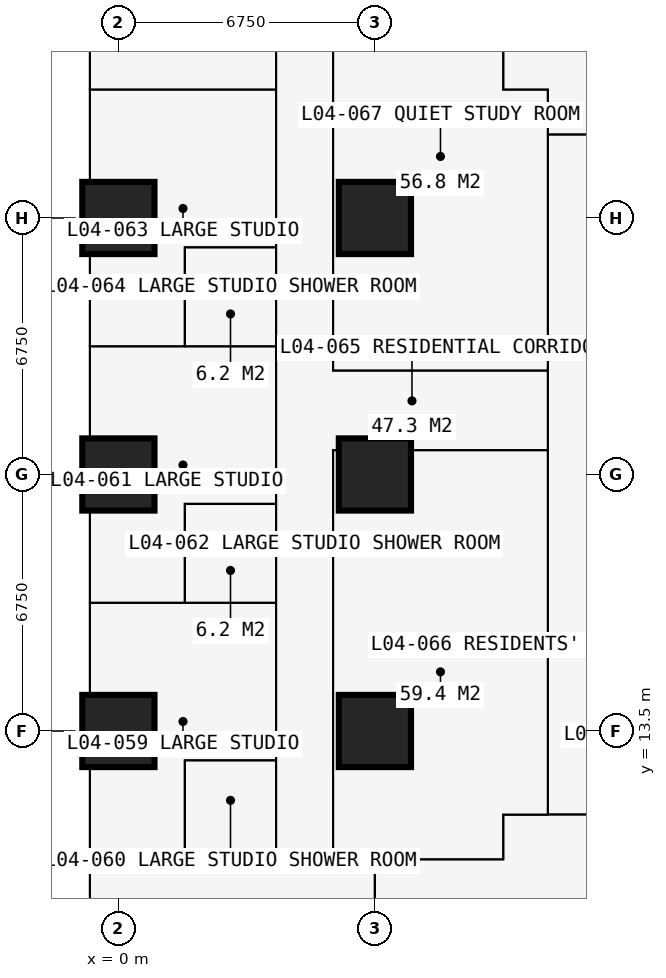
"""IFC4 building model, lengths in metres.
Left out: names, types, materials, properties, quantities, classifications, styles, units other than length and angle.
Written with IfcOpenShell. Run it as: python <this file> out.ifc"""

import sys

from ifc_helpers import new_model, si_unit, direction, frame, frame_2d, origin, origin_2d, place, context, subcontext, project, spatial, rectangle, extrude, element, fill, save


model = new_model("IFC4")
c1 = context("Model", 3, precision=1e-05, world=origin(), true_north=direction((0.0, 1.0)))
c2 = subcontext(c1, "Body", "Model", "MODEL_VIEW")
j1 = project(units=[si_unit("LENGTHUNIT", "METRE"), si_unit("PLANEANGLEUNIT", "RADIAN")], contexts=[c1])
p1 = place(None, origin())
s1 = spatial("IfcSite", under=j1, at=p1, CompositionType="ELEMENT")
p2 = place(p1, origin())
s2 = spatial("IfcBuilding", under=s1, at=p2, CompositionType="ELEMENT")
p3 = place(p2, frame((0.0, 0.0, 18.0)))
s3 = spatial("IfcBuildingStorey", under=s2, at=p3, CompositionType="ELEMENT", Elevation=18.0)
for number, where, z_axis, x_axis in (
    (1, (0.0, 13.5, 0.0), (0.0, 0.0, 1.0), (1.0, 0.0, 0.0)),
    (2, (0.0, 20.25, 0.0), (0.0, 0.0, 1.0), (1.0, 0.0, 0.0)),
    (3, (0.0, 27.0, 0.0), (0.0, 0.0, 1.0), (1.0, 0.0, 0.0)),
    (4, (6.75, 13.5, 0.0), (0.0, 0.0, 1.0), (1.0, 0.0, 0.0)),
    (5, (6.75, 20.25, 0.0), (0.0, 0.0, 1.0), (1.0, 0.0, 0.0)),
    (6, (6.75, 27.0, 0.0), (0.0, 0.0, 1.0), (1.0, 0.0, 0.0)),
):
    element("IfcColumn", number, at=place(p3, frame(where, z_axis=z_axis, x_axis=x_axis)), inside=s3, PredefinedType="COLUMN", context=c2, shape_type="SweptSolid", body=[
        extrude(rectangle(XDim=1.9, YDim=1.9, at=origin_2d()), origin(), (0.0, 0.0, 1.0), 3.6),
    ])
p4 = place(p3, frame((-0.75, 13.5, 0.0), z_axis=(0.0, 0.0, 1.0), x_axis=(0.0, 1.0, 0.0)))
e7 = element("IfcWall", 7, at=p4, inside=s3, PredefinedType="SOLIDWALL", context=c2, shape_type="SweptSolid", body=[
    extrude(rectangle(XDim=6.75, YDim=0.15, at=frame_2d((3.375, 0.0))), origin(), (0.0, 0.0, 1.0), 3.375),
])
p5 = place(p4, frame((0.996, 0.0, 0.0)))
e8 = element("IfcOpeningElement", 8, at=p5, cuts=e7, PredefinedType="OPENING", context=c2, shape_type="SweptSolid", body=[
    extrude(rectangle(XDim=1.0, YDim=2.2, at=frame_2d((0.5, 1.1))), frame((0.0, 0.085, 0.0), z_axis=(0.0, -1.0, 0.0), x_axis=(1.0, 0.0, 0.0)), (0.0, 0.0, 1.0), 0.17),
])
p6 = place(p4, frame((2.042, 0.0, 0.9)))
e9 = element("IfcOpeningElement", 9, at=p6, cuts=e7, PredefinedType="OPENING", context=c2, shape_type="SweptSolid", body=[
    extrude(rectangle(XDim=1.2, YDim=1.8, at=frame_2d((0.6, 0.9))), frame((0.0, 0.085, 0.0), z_axis=(0.0, -1.0, 0.0), x_axis=(1.0, 0.0, 0.0)), (0.0, 0.0, 1.0), 0.17),
])
p7 = place(p4, frame((4.754, 0.0, 0.0)))
e10 = element("IfcOpeningElement", 10, at=p7, cuts=e7, PredefinedType="OPENING", context=c2, shape_type="SweptSolid", body=[
    extrude(rectangle(XDim=1.0, YDim=2.2, at=frame_2d((0.5, 1.1))), frame((0.0, 0.085, 0.0), z_axis=(0.0, -1.0, 0.0), x_axis=(1.0, 0.0, 0.0)), (0.0, 0.0, 1.0), 0.17),
])
p8 = place(p4, frame((3.508, 0.0, 0.9)))
e11 = element("IfcOpeningElement", 11, at=p8, cuts=e7, PredefinedType="OPENING", context=c2, shape_type="SweptSolid", body=[
    extrude(rectangle(XDim=1.2, YDim=1.8, at=frame_2d((0.6, 0.9))), frame((0.0, 0.085, 0.0), z_axis=(0.0, -1.0, 0.0), x_axis=(1.0, 0.0, 0.0)), (0.0, 0.0, 1.0), 0.17),
])
p9 = place(p3, frame((-0.85, 16.875, 0.0), z_axis=(0.0, 0.0, 1.0), x_axis=(-1.0, 0.0, 0.0)))
e12 = element("IfcWall", 12, at=p9, inside=s3, PredefinedType="USERDEFINED", context=c2, shape_type="SweptSolid", body=[
    extrude(rectangle(XDim=2.2, YDim=1.0, at=frame_2d((1.1, 0.0))), origin(), (0.0, 0.0, 1.0), 0.9),
])
p10 = place(p3, frame((-0.734, 10.125, 0.0), z_axis=(0.0, 0.0, 1.0), x_axis=(1.0, 0.0, 0.0)))
e13 = element("IfcWall", 13, at=p10, inside=s3, PredefinedType="PARTITIONING", context=c2, shape_type="SweptSolid", body=[
    extrude(rectangle(XDim=10.859, YDim=0.15, at=frame_2d((5.429, 0.0))), origin(), (0.0, 0.0, 1.0), 3.375),
])
p11 = place(p3, frame((-0.734, 16.875, 0.0), z_axis=(0.0, 0.0, 1.0), x_axis=(1.0, 0.0, 0.0)))
e14 = element("IfcWall", 14, at=p11, inside=s3, PredefinedType="PARTITIONING", context=c2, shape_type="SweptSolid", body=[
    extrude(rectangle(XDim=4.884, YDim=0.175, at=frame_2d((2.442, 0.0))), origin(), (0.0, 0.0, 1.0), 3.375),
])
p12 = place(p11, frame((3.234, 0.0, 0.0)))
e15 = element("IfcOpeningElement", 15, at=p12, cuts=e14, PredefinedType="OPENING", context=c2, shape_type="SweptSolid", body=[
    extrude(rectangle(XDim=0.9, YDim=2.2, at=frame_2d((0.45, 1.1))), frame((0.0, 0.097, 0.0), z_axis=(0.0, -1.0, 0.0), x_axis=(1.0, 0.0, 0.0)), (0.0, 0.0, 1.0), 0.195),
])
p13 = place(p3, frame((-0.734, 23.625, 0.0), z_axis=(0.0, 0.0, 1.0), x_axis=(1.0, 0.0, 0.0)))
e16 = element("IfcWall", 16, at=p13, inside=s3, PredefinedType="PARTITIONING", context=c2, shape_type="SweptSolid", body=[
    extrude(rectangle(XDim=4.884, YDim=0.175, at=frame_2d((2.442, 0.0))), origin(), (0.0, 0.0, 1.0), 3.375),
])
p14 = place(p13, frame((3.234, 0.0, 0.0)))
e17 = element("IfcOpeningElement", 17, at=p14, cuts=e16, PredefinedType="OPENING", context=c2, shape_type="SweptSolid", body=[
    extrude(rectangle(XDim=0.9, YDim=2.2, at=frame_2d((0.45, 1.1))), frame((0.0, 0.097, 0.0), z_axis=(0.0, -1.0, 0.0), x_axis=(1.0, 0.0, 0.0)), (0.0, 0.0, 1.0), 0.195),
])
p15 = place(p3, frame((-0.734, 30.375, 0.0), z_axis=(0.0, 0.0, 1.0), x_axis=(1.0, 0.0, 0.0)))
e18 = element("IfcWall", 18, at=p15, inside=s3, PredefinedType="PARTITIONING", context=c2, shape_type="SweptSolid", body=[
    extrude(rectangle(XDim=4.884, YDim=0.15, at=frame_2d((2.442, 0.0))), origin(), (0.0, 0.0, 1.0), 3.375),
])
p16 = place(p3, frame((1.75, 10.125, 0.0), z_axis=(0.0, 0.0, 1.0), x_axis=(0.0, 1.0, 0.0)))
e19 = element("IfcWall", 19, at=p16, inside=s3, PredefinedType="PARTITIONING", context=c2, shape_type="SweptSolid", body=[
    extrude(rectangle(XDim=2.6, YDim=0.1, at=frame_2d((1.3, 0.0))), origin(), (0.0, 0.0, 1.0), 3.375),
])
p17 = place(p16, frame((0.85, 0.0, 0.0)))
e20 = element("IfcOpeningElement", 20, at=p17, cuts=e19, PredefinedType="OPENING", context=c2, shape_type="SweptSolid", body=[
    extrude(rectangle(XDim=0.9, YDim=2.2, at=frame_2d((0.45, 1.1))), frame((0.0, 0.06, 0.0), z_axis=(0.0, -1.0, 0.0), x_axis=(1.0, 0.0, 0.0)), (0.0, 0.0, 1.0), 0.12),
])
p18 = place(p3, frame((1.75, 12.725, 0.0), z_axis=(0.0, 0.0, 1.0), x_axis=(1.0, 0.0, 0.0)))
e21 = element("IfcWall", 21, at=p18, inside=s3, PredefinedType="PARTITIONING", context=c2, shape_type="SweptSolid", body=[
    extrude(rectangle(XDim=2.4, YDim=0.1, at=frame_2d((1.2, 0.0))), origin(), (0.0, 0.0, 1.0), 3.375),
])
p19 = place(p3, frame((1.75, 16.875, 0.0), z_axis=(0.0, 0.0, 1.0), x_axis=(0.0, 1.0, 0.0)))
e22 = element("IfcWall", 22, at=p19, inside=s3, PredefinedType="PARTITIONING", context=c2, shape_type="SweptSolid", body=[
    extrude(rectangle(XDim=2.6, YDim=0.1, at=frame_2d((1.3, 0.0))), origin(), (0.0, 0.0, 1.0), 3.375),
])
p20 = place(p3, frame((1.75, 19.475, 0.0), z_axis=(0.0, 0.0, 1.0), x_axis=(1.0, 0.0, 0.0)))
e23 = element("IfcWall", 23, at=p20, inside=s3, PredefinedType="PARTITIONING", context=c2, shape_type="SweptSolid", body=[
    extrude(rectangle(XDim=2.4, YDim=0.1, at=frame_2d((1.2, 0.0))), origin(), (0.0, 0.0, 1.0), 3.375),
])
p21 = place(p3, frame((1.75, 23.625, 0.0), z_axis=(0.0, 0.0, 1.0), x_axis=(0.0, 1.0, 0.0)))
e24 = element("IfcWall", 24, at=p21, inside=s3, PredefinedType="PARTITIONING", context=c2, shape_type="SweptSolid", body=[
    extrude(rectangle(XDim=2.6, YDim=0.1, at=frame_2d((1.3, 0.0))), origin(), (0.0, 0.0, 1.0), 3.375),
])
p22 = place(p3, frame((1.75, 26.225, 0.0), z_axis=(0.0, 0.0, 1.0), x_axis=(1.0, 0.0, 0.0)))
e25 = element("IfcWall", 25, at=p22, inside=s3, PredefinedType="PARTITIONING", context=c2, shape_type="SweptSolid", body=[
    extrude(rectangle(XDim=2.4, YDim=0.1, at=frame_2d((1.2, 0.0))), origin(), (0.0, 0.0, 1.0), 3.375),
])
p23 = place(p3, frame((4.15, 10.125, 0.0), z_axis=(0.0, 0.0, 1.0), x_axis=(0.0, 1.0, 0.0)))
e26 = element("IfcWall", 26, at=p23, inside=s3, PredefinedType="PARTITIONING", context=c2, shape_type="SweptSolid", body=[
    extrude(rectangle(XDim=23.625, YDim=0.15, at=frame_2d((11.812, 0.0))), origin(), (0.0, 0.0, 1.0), 3.375),
])
p24 = place(p23, frame((4.2, 0.0, 0.0)))
e27 = element("IfcOpeningElement", 27, at=p24, cuts=e26, PredefinedType="OPENING", context=c2, shape_type="SweptSolid", body=[
    extrude(rectangle(XDim=0.95, YDim=2.2, at=frame_2d((0.475, 1.1))), frame((0.0, 0.085, 0.0), z_axis=(0.0, -1.0, 0.0), x_axis=(1.0, 0.0, 0.0)), (0.0, 0.0, 1.0), 0.17),
])
p25 = place(p23, frame((10.95, 0.0, 0.0)))
e28 = element("IfcOpeningElement", 28, at=p25, cuts=e26, PredefinedType="OPENING", context=c2, shape_type="SweptSolid", body=[
    extrude(rectangle(XDim=0.95, YDim=2.2, at=frame_2d((0.475, 1.1))), frame((0.0, 0.085, 0.0), z_axis=(0.0, -1.0, 0.0), x_axis=(1.0, 0.0, 0.0)), (0.0, 0.0, 1.0), 0.17),
])
p26 = place(p23, frame((17.7, 0.0, 0.0)))
e29 = element("IfcOpeningElement", 29, at=p26, cuts=e26, PredefinedType="OPENING", context=c2, shape_type="SweptSolid", body=[
    extrude(rectangle(XDim=0.95, YDim=2.2, at=frame_2d((0.475, 1.1))), frame((0.0, 0.085, 0.0), z_axis=(0.0, -1.0, 0.0), x_axis=(1.0, 0.0, 0.0)), (0.0, 0.0, 1.0), 0.17),
])
p27 = place(p3, frame((5.65, 10.125, 0.0), z_axis=(0.0, 0.0, 1.0), x_axis=(0.0, 1.0, 0.0)))
e30 = element("IfcWall", 30, at=p27, inside=s3, PredefinedType="PARTITIONING", context=c2, shape_type="SweptSolid", body=[
    extrude(rectangle(XDim=10.762, YDim=0.15, at=frame_2d((5.381, 0.0))), origin(), (0.0, 0.0, 1.0), 3.375),
])
p28 = place(p27, frame((4.9, 0.0, 0.0)))
e31 = element("IfcOpeningElement", 31, at=p28, cuts=e30, PredefinedType="OPENING", context=c2, shape_type="SweptSolid", body=[
    extrude(rectangle(XDim=0.95, YDim=2.2, at=frame_2d((0.475, 1.1))), frame((0.0, 0.085, 0.0), z_axis=(0.0, -1.0, 0.0), x_axis=(1.0, 0.0, 0.0)), (0.0, 0.0, 1.0), 0.17),
])
p29 = place(p3, frame((5.65, 20.887, 0.0), z_axis=(0.0, 0.0, 1.0), x_axis=(1.0, 0.0, 0.0)))
e32 = element("IfcWall", 32, at=p29, inside=s3, PredefinedType="PARTITIONING", context=c2, shape_type="SweptSolid", body=[
    extrude(rectangle(XDim=5.65, YDim=0.15, at=frame_2d((2.825, 0.0))), origin(), (0.0, 0.0, 1.0), 3.375),
])
p30 = place(p3, frame((5.65, 22.988, 0.0), z_axis=(0.0, 0.0, 1.0), x_axis=(0.0, 1.0, 0.0)))
e33 = element("IfcWall", 33, at=p30, inside=s3, PredefinedType="PARTITIONING", context=c2, shape_type="SweptSolid", body=[
    extrude(rectangle(XDim=10.762, YDim=0.15, at=frame_2d((5.381, 0.0))), origin(), (0.0, 0.0, 1.0), 3.375),
])
p31 = place(p30, frame((5.0, 0.0, 0.0)))
e34 = element("IfcOpeningElement", 34, at=p31, cuts=e33, PredefinedType="OPENING", context=c2, shape_type="SweptSolid", body=[
    extrude(rectangle(XDim=0.95, YDim=2.2, at=frame_2d((0.475, 1.1))), frame((0.0, 0.085, 0.0), z_axis=(0.0, -1.0, 0.0), x_axis=(1.0, 0.0, 0.0)), (0.0, 0.0, 1.0), 0.17),
])
p32 = place(p3, frame((5.65, 22.988, 0.0), z_axis=(0.0, 0.0, 1.0), x_axis=(1.0, 0.0, 0.0)))
e35 = element("IfcWall", 35, at=p32, inside=s3, PredefinedType="PARTITIONING", context=c2, shape_type="SweptSolid", body=[
    extrude(rectangle(XDim=5.65, YDim=0.15, at=frame_2d((2.825, 0.0))), origin(), (0.0, 0.0, 1.0), 3.375),
])
p33 = place(p3, frame((6.75, 4.15, 0.0), z_axis=(0.0, 0.0, 1.0), x_axis=(0.0, 1.0, 0.0)))
e36 = element("IfcWall", 36, at=p33, inside=s3, PredefinedType="PARTITIONING", context=c2, shape_type="SweptSolid", body=[
    extrude(rectangle(XDim=5.975, YDim=0.15, at=frame_2d((2.988, 0.0))), origin(), (0.0, 0.0, 1.0), 2.877),
])
p34 = place(p3, frame((10.125, 10.125, 0.0), z_axis=(0.0, 0.0, 1.0), x_axis=(0.0, 1.0, 0.0)))
e37 = element("IfcWall", 37, at=p34, inside=s3, PredefinedType="PARTITIONING", context=c2, shape_type="SweptSolid", body=[
    extrude(rectangle(XDim=1.175, YDim=0.15, at=frame_2d((0.587, 0.0))), origin(), (0.0, 0.0, 1.0), 3.375),
])
p35 = place(p3, frame((10.125, 11.3, 0.0), z_axis=(0.0, 0.0, 1.0), x_axis=(1.0, 0.0, 0.0)))
e38 = element("IfcWall", 38, at=p35, inside=s3, PredefinedType="PARTITIONING", context=c2, shape_type="SweptSolid", body=[
    extrude(rectangle(XDim=20.675, YDim=0.15, at=frame_2d((10.337, 0.0))), origin(), (0.0, 0.0, 1.0), 3.375),
])
p36 = place(p35, frame((8.375, 0.0, 0.0)))
e39 = element("IfcOpeningElement", 39, at=p36, cuts=e38, PredefinedType="OPENING", context=c2, shape_type="SweptSolid", body=[
    extrude(rectangle(XDim=1.0, YDim=2.2, at=frame_2d((0.5, 1.1))), frame((0.0, 0.085, 0.0), z_axis=(0.0, -1.0, 0.0), x_axis=(1.0, 0.0, 0.0)), (0.0, 0.0, 1.0), 0.17),
])
p37 = place(p35, frame((10.975, 0.0, 0.0)))
e40 = element("IfcOpeningElement", 40, at=p37, cuts=e38, PredefinedType="OPENING", context=c2, shape_type="SweptSolid", body=[
    extrude(rectangle(XDim=1.0, YDim=2.2, at=frame_2d((0.5, 1.1))), frame((0.0, 0.085, 0.0), z_axis=(0.0, -1.0, 0.0), x_axis=(1.0, 0.0, 0.0)), (0.0, 0.0, 1.0), 0.17),
])
p38 = place(p35, frame((3.925, 0.0, 0.0)))
e41 = element("IfcOpeningElement", 41, at=p38, cuts=e38, PredefinedType="OPENING", context=c2, shape_type="SweptSolid", body=[
    extrude(rectangle(XDim=0.95, YDim=2.2, at=frame_2d((0.475, 1.1))), frame((0.0, 0.085, 0.0), z_axis=(0.0, -1.0, 0.0), x_axis=(1.0, 0.0, 0.0)), (0.0, 0.0, 1.0), 0.17),
])
p39 = place(p3, frame((10.125, 30.375, 0.0), z_axis=(0.0, 0.0, 1.0), x_axis=(0.0, 1.0, 0.0)))
e42 = element("IfcWall", 42, at=p39, inside=s3, PredefinedType="PARTITIONING", context=c2, shape_type="SweptSolid", body=[
    extrude(rectangle(XDim=10.859, YDim=0.15, at=frame_2d((5.429, 0.0))), origin(), (0.0, 0.0, 1.0), 3.375),
])
p40 = place(p39, frame((4.725, 0.0, 0.0)))
e43 = element("IfcOpeningElement", 43, at=p40, cuts=e42, PredefinedType="OPENING", context=c2, shape_type="SweptSolid", body=[
    extrude(rectangle(XDim=1.0, YDim=2.2, at=frame_2d((0.5, 1.1))), frame((0.0, 0.085, 0.0), z_axis=(0.0, -1.0, 0.0), x_axis=(1.0, 0.0, 0.0)), (0.0, 0.0, 1.0), 0.17),
])
p41 = place(p3, frame((10.125, 30.375, 0.0), z_axis=(0.0, 0.0, 1.0), x_axis=(1.0, 0.0, 0.0)))
e44 = element("IfcWall", 44, at=p41, inside=s3, PredefinedType="PARTITIONING", context=c2, shape_type="SweptSolid", body=[
    extrude(rectangle(XDim=1.175, YDim=0.15, at=frame_2d((0.587, 0.0))), origin(), (0.0, 0.0, 1.0), 3.375),
])
p42 = place(p3, frame((11.3, 11.3, 0.0), z_axis=(0.0, 0.0, 1.0), x_axis=(0.0, 1.0, 0.0)))
e45 = element("IfcWall", 45, at=p42, inside=s3, PredefinedType="PARTITIONING", context=c2, shape_type="SweptSolid", body=[
    extrude(rectangle(XDim=19.075, YDim=0.15, at=frame_2d((9.538, 0.0))), origin(), (0.0, 0.0, 1.0), 3.375),
])
p43 = place(p42, frame((10.137, 0.0, 0.0)))
e46 = element("IfcOpeningElement", 46, at=p43, cuts=e45, PredefinedType="OPENING", context=c2, shape_type="SweptSolid", body=[
    extrude(rectangle(XDim=1.0, YDim=2.2, at=frame_2d((0.5, 1.1))), frame((0.0, 0.085, 0.0), z_axis=(0.0, -1.0, 0.0), x_axis=(1.0, 0.0, 0.0)), (0.0, 0.0, 1.0), 0.17),
])
p44 = place(p3, frame((11.3, 29.2, 0.0), z_axis=(0.0, 0.0, 1.0), x_axis=(1.0, 0.0, 0.0)))
e47 = element("IfcWall", 47, at=p44, inside=s3, PredefinedType="PARTITIONING", context=c2, shape_type="SweptSolid", body=[
    extrude(rectangle(XDim=19.075, YDim=0.15, at=frame_2d((9.538, 0.0))), origin(), (0.0, 0.0, 1.0), 3.375),
])
p45 = place(p44, frame((10.137, 0.0, 0.0)))
e48 = element("IfcOpeningElement", 48, at=p45, cuts=e47, PredefinedType="OPENING", context=c2, shape_type="SweptSolid", body=[
    extrude(rectangle(XDim=1.0, YDim=2.2, at=frame_2d((0.5, 1.1))), frame((0.0, 0.085, 0.0), z_axis=(0.0, -1.0, 0.0), x_axis=(1.0, 0.0, 0.0)), (0.0, 0.0, 1.0), 0.17),
])
p46 = place(p5, origin())
e49 = element("IfcDoor", 49, at=p46, inside=s3, OperationType="SINGLE_SWING_LEFT", PredefinedType="DOOR", context=c2, shape_type="SweptSolid", body=[
    extrude(rectangle(XDim=1.0, YDim=2.2, at=frame_2d((0.5, 1.1))), frame((0.0, 0.025, 0.0), z_axis=(0.0, -1.0, 0.0), x_axis=(1.0, 0.0, 0.0)), (0.0, 0.0, 1.0), 0.05),
])
fill(e8, e49)
p47 = place(p6, origin())
e50 = element("IfcWindow", 50, at=p47, inside=s3, PartitioningType="SINGLE_PANEL", PredefinedType="WINDOW", context=c2, shape_type="SweptSolid", body=[
    extrude(rectangle(XDim=1.2, YDim=1.8, at=frame_2d((0.6, 0.9))), frame((0.0, 0.03, 0.0), z_axis=(0.0, -1.0, 0.0), x_axis=(1.0, 0.0, 0.0)), (0.0, 0.0, 1.0), 0.06),
])
fill(e9, e50)
p48 = place(p7, origin())
e51 = element("IfcDoor", 51, at=p48, inside=s3, OperationType="SINGLE_SWING_RIGHT", PredefinedType="DOOR", context=c2, shape_type="SweptSolid", body=[
    extrude(rectangle(XDim=1.0, YDim=2.2, at=frame_2d((0.5, 1.1))), frame((0.0, 0.025, 0.0), z_axis=(0.0, -1.0, 0.0), x_axis=(1.0, 0.0, 0.0)), (0.0, 0.0, 1.0), 0.05),
])
fill(e10, e51)
p49 = place(p8, origin())
e52 = element("IfcWindow", 52, at=p49, inside=s3, PartitioningType="SINGLE_PANEL", PredefinedType="WINDOW", context=c2, shape_type="SweptSolid", body=[
    extrude(rectangle(XDim=1.2, YDim=1.8, at=frame_2d((0.6, 0.9))), frame((0.0, 0.03, 0.0), z_axis=(0.0, -1.0, 0.0), x_axis=(1.0, 0.0, 0.0)), (0.0, 0.0, 1.0), 0.06),
])
fill(e11, e52)
p50 = place(p24, origin())
e53 = element("IfcDoor", 53, at=p50, inside=s3, OperationType="SINGLE_SWING_LEFT", PredefinedType="DOOR", context=c2, shape_type="SweptSolid", body=[
    extrude(rectangle(XDim=0.95, YDim=2.2, at=frame_2d((0.475, 1.1))), frame((0.0, 0.025, 0.0), z_axis=(0.0, -1.0, 0.0), x_axis=(1.0, 0.0, 0.0)), (0.0, 0.0, 1.0), 0.05),
])
fill(e27, e53)
p51 = place(p17, origin())
e54 = element("IfcDoor", 54, at=p51, inside=s3, OperationType="SINGLE_SWING_RIGHT", PredefinedType="DOOR", context=c2, shape_type="SweptSolid", body=[
    extrude(rectangle(XDim=0.9, YDim=2.2, at=frame_2d((0.45, 1.1))), frame((0.0, 0.025, 0.0), z_axis=(0.0, -1.0, 0.0), x_axis=(1.0, 0.0, 0.0)), (0.0, 0.0, 1.0), 0.05),
])
fill(e20, e54)
p52 = place(p25, origin())
e55 = element("IfcDoor", 55, at=p52, inside=s3, OperationType="SINGLE_SWING_LEFT", PredefinedType="DOOR", context=c2, shape_type="SweptSolid", body=[
    extrude(rectangle(XDim=0.95, YDim=2.2, at=frame_2d((0.475, 1.1))), frame((0.0, 0.025, 0.0), z_axis=(0.0, -1.0, 0.0), x_axis=(1.0, 0.0, 0.0)), (0.0, 0.0, 1.0), 0.05),
])
fill(e28, e55)
p53 = place(p12, origin())
e56 = element("IfcDoor", 56, at=p53, inside=s3, OperationType="SINGLE_SWING_RIGHT", PredefinedType="DOOR", context=c2, shape_type="SweptSolid", body=[
    extrude(rectangle(XDim=0.9, YDim=2.2, at=frame_2d((0.45, 1.1))), frame((0.0, 0.025, 0.0), z_axis=(0.0, -1.0, 0.0), x_axis=(1.0, 0.0, 0.0)), (0.0, 0.0, 1.0), 0.05),
])
fill(e15, e56)
p54 = place(p26, origin())
e57 = element("IfcDoor", 57, at=p54, inside=s3, OperationType="SINGLE_SWING_LEFT", PredefinedType="DOOR", context=c2, shape_type="SweptSolid", body=[
    extrude(rectangle(XDim=0.95, YDim=2.2, at=frame_2d((0.475, 1.1))), frame((0.0, 0.025, 0.0), z_axis=(0.0, -1.0, 0.0), x_axis=(1.0, 0.0, 0.0)), (0.0, 0.0, 1.0), 0.05),
])
fill(e29, e57)
p55 = place(p14, origin())
e58 = element("IfcDoor", 58, at=p55, inside=s3, OperationType="SINGLE_SWING_RIGHT", PredefinedType="DOOR", context=c2, shape_type="SweptSolid", body=[
    extrude(rectangle(XDim=0.9, YDim=2.2, at=frame_2d((0.45, 1.1))), frame((0.0, 0.025, 0.0), z_axis=(0.0, -1.0, 0.0), x_axis=(1.0, 0.0, 0.0)), (0.0, 0.0, 1.0), 0.05),
])
fill(e17, e58)
p56 = place(p43, origin())
e59 = element("IfcDoor", 59, at=p56, inside=s3, OperationType="SINGLE_SWING_LEFT", PredefinedType="DOOR", context=c2, shape_type="SweptSolid", body=[
    extrude(rectangle(XDim=1.0, YDim=2.2, at=frame_2d((0.5, 1.1))), frame((0.0, 0.025, 0.0), z_axis=(0.0, -1.0, 0.0), x_axis=(1.0, 0.0, 0.0)), (0.0, 0.0, 1.0), 0.05),
])
fill(e46, e59)
p57 = place(p28, origin())
e60 = element("IfcDoor", 60, at=p57, inside=s3, OperationType="SINGLE_SWING_LEFT", PredefinedType="DOOR", context=c2, shape_type="SweptSolid", body=[
    extrude(rectangle(XDim=0.95, YDim=2.2, at=frame_2d((0.475, 1.1))), frame((0.0, 0.025, 0.0), z_axis=(0.0, -1.0, 0.0), x_axis=(1.0, 0.0, 0.0)), (0.0, 0.0, 1.0), 0.05),
])
fill(e31, e60)
p58 = place(p31, origin())
e61 = element("IfcDoor", 61, at=p58, inside=s3, OperationType="SINGLE_SWING_LEFT", PredefinedType="DOOR", context=c2, shape_type="SweptSolid", body=[
    extrude(rectangle(XDim=0.95, YDim=2.2, at=frame_2d((0.475, 1.1))), frame((0.0, 0.025, 0.0), z_axis=(0.0, -1.0, 0.0), x_axis=(1.0, 0.0, 0.0)), (0.0, 0.0, 1.0), 0.05),
])
fill(e34, e61)
save(model, sys.argv[1])
